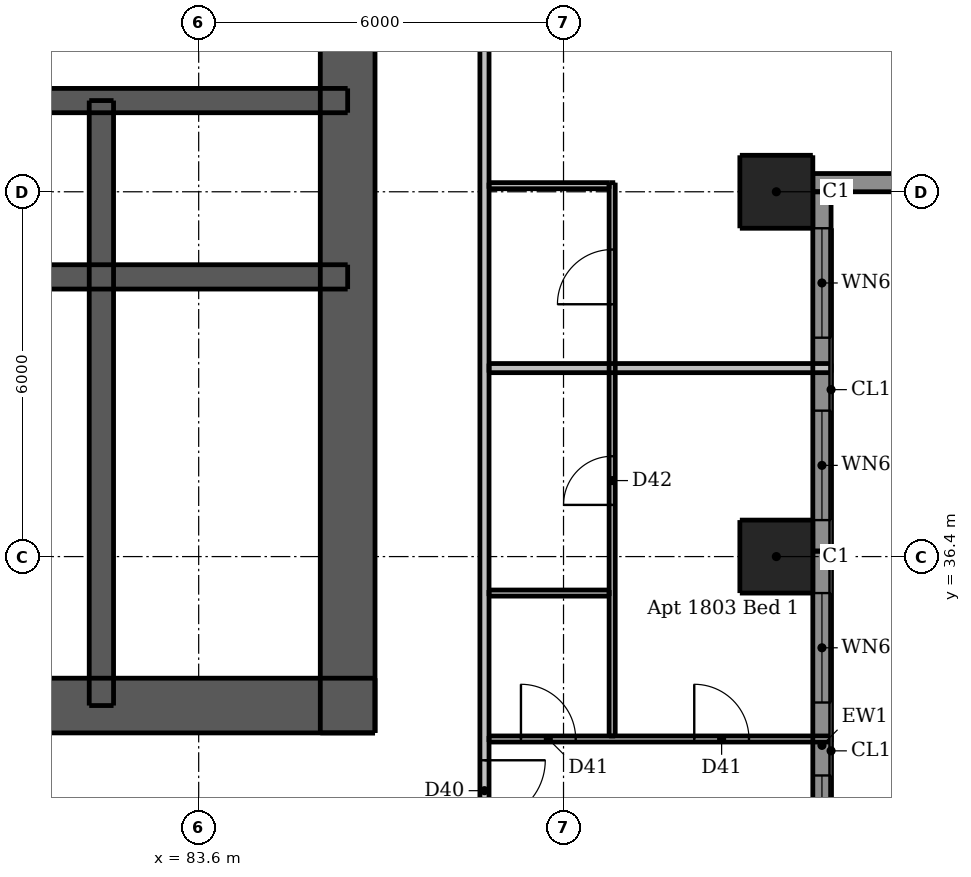
"""IFC4 building model, lengths in metres.
Left out: names, types, materials, properties, quantities, classifications, styles, units other than length and angle.
Written with IfcOpenShell. Run it as: python <this file> out.ifc"""

import sys

from ifc_helpers import new_model, si_unit, direction, frame, frame_2d, origin, origin_2d, place, context, subcontext, project, spatial, rectangle, extrude, element, fill, save


model = new_model("IFC4")
c1 = context("Model", 3, precision=1e-05, world=origin(), true_north=direction((0.0, 1.0)))
c2 = subcontext(c1, "Body", "Model", "MODEL_VIEW")
j1 = project(units=[si_unit("LENGTHUNIT", "METRE"), si_unit("PLANEANGLEUNIT", "RADIAN")], contexts=[c1])
p1 = place(None, origin())
s1 = spatial("IfcSite", under=j1, at=p1, CompositionType="ELEMENT")
p2 = place(p1, origin())
s2 = spatial("IfcBuilding", under=s1, at=p2, CompositionType="ELEMENT")
p3 = place(p2, frame((0.0, 0.0, 66.4)))
s3 = spatial("IfcBuildingStorey", under=s2, at=p3, CompositionType="ELEMENT", Elevation=66.4)
p4 = place(p3, frame((62.5, 33.95, 0.0), z_axis=(0.0, 0.0, 1.0), x_axis=(1.0, 0.0, 0.0)))
e1 = element("IfcWall", 1, at=p4, inside=s3, PredefinedType="SHEAR", context=c2, shape_type="SweptSolid", body=[
    extrude(rectangle(XDim=24.0, YDim=0.9, at=frame_2d((12.0, 0.0))), origin(), (0.0, 0.0, 1.0), 2.95),
])
p5 = place(p4, frame((2.05, 0.0, 0.0)))
e2 = element("IfcOpeningElement", 2, at=p5, cuts=e1, PredefinedType="OPENING", context=c2, shape_type="SweptSolid", body=[
    extrude(rectangle(XDim=1.1, YDim=2.1, at=frame_2d((0.55, 1.05))), frame((0.0, 0.46, 0.0), z_axis=(0.0, -1.0, 0.0), x_axis=(1.0, 0.0, 0.0)), (0.0, 0.0, 1.0), 0.92),
])
p6 = place(p4, frame((20.85, 0.0, 0.0)))
e3 = element("IfcOpeningElement", 3, at=p6, cuts=e1, PredefinedType="OPENING", context=c2, shape_type="SweptSolid", body=[
    extrude(rectangle(XDim=1.1, YDim=2.1, at=frame_2d((0.55, 1.05))), frame((0.0, 0.46, 0.0), z_axis=(0.0, -1.0, 0.0), x_axis=(1.0, 0.0, 0.0)), (0.0, 0.0, 1.0), 0.92),
])
p7 = place(p4, frame((8.0, 0.0, 0.0)))
e4 = element("IfcOpeningElement", 4, at=p7, cuts=e1, PredefinedType="OPENING", context=c2, shape_type="SweptSolid", body=[
    extrude(rectangle(XDim=1.1, YDim=2.1, at=frame_2d((0.55, 1.05))), frame((0.0, 0.46, 0.0), z_axis=(0.0, -1.0, 0.0), x_axis=(1.0, 0.0, 0.0)), (0.0, 0.0, 1.0), 0.92),
])
p8 = place(p4, frame((15.3, 0.0, 0.0)))
e5 = element("IfcOpeningElement", 5, at=p8, cuts=e1, PredefinedType="OPENING", context=c2, shape_type="SweptSolid", body=[
    extrude(rectangle(XDim=0.9, YDim=2.1, at=frame_2d((0.45, 1.05))), frame((0.0, 0.46, 0.0), z_axis=(0.0, -1.0, 0.0), x_axis=(1.0, 0.0, 0.0)), (0.0, 0.0, 1.0), 0.92),
])
p9 = place(p3, frame((86.05, 33.5, 0.0), z_axis=(0.0, 0.0, 1.0), x_axis=(0.0, 1.0, 0.0)))
e6 = element("IfcWall", 6, at=p9, inside=s3, PredefinedType="SHEAR", context=c2, shape_type="SweptSolid", body=[
    extrude(rectangle(XDim=24.0, YDim=0.9, at=frame_2d((12.0, 0.0))), origin(), (0.0, 0.0, 1.0), 2.95),
])
p10 = place(p9, frame((11.2, 0.0, 0.0)))
e7 = element("IfcOpeningElement", 7, at=p10, cuts=e6, PredefinedType="OPENING", context=c2, shape_type="SweptSolid", body=[
    extrude(rectangle(XDim=1.6, YDim=2.1, at=frame_2d((0.8, 1.05))), frame((0.0, 0.46, 0.0), z_axis=(0.0, -1.0, 0.0), x_axis=(1.0, 0.0, 0.0)), (0.0, 0.0, 1.0), 0.92),
])
p11 = place(p3, frame((62.95, 41.0, 0.0), z_axis=(0.0, 0.0, 1.0), x_axis=(1.0, 0.0, 0.0)))
e8 = element("IfcWall", 8, at=p11, inside=s3, PredefinedType="SHEAR", context=c2, shape_type="SweptSolid", body=[
    extrude(rectangle(XDim=23.1, YDim=0.4, at=frame_2d((11.55, 0.0))), origin(), (0.0, 0.0, 1.0), 2.95),
])
p12 = place(p3, frame((62.95, 43.9, 0.0), z_axis=(0.0, 0.0, 1.0), x_axis=(1.0, 0.0, 0.0)))
e9 = element("IfcWall", 9, at=p12, inside=s3, PredefinedType="SHEAR", context=c2, shape_type="SweptSolid", body=[
    extrude(rectangle(XDim=23.1, YDim=0.4, at=frame_2d((11.55, 0.0))), origin(), (0.0, 0.0, 1.0), 2.95),
])
p13 = place(p12, frame((0.662, 0.0, 0.0)))
e10 = element("IfcOpeningElement", 10, at=p13, cuts=e9, PredefinedType="OPENING", context=c2, shape_type="SweptSolid", body=[
    extrude(rectangle(XDim=0.8, YDim=2.1, at=frame_2d((0.4, 1.05))), frame((0.0, 0.21, 0.0), z_axis=(0.0, -1.0, 0.0), x_axis=(1.0, 0.0, 0.0)), (0.0, 0.0, 1.0), 0.42),
])
p14 = place(p12, frame((2.312, 0.0, 0.0)))
e11 = element("IfcOpeningElement", 11, at=p14, cuts=e9, PredefinedType="OPENING", context=c2, shape_type="SweptSolid", body=[
    extrude(rectangle(XDim=0.9, YDim=2.1, at=frame_2d((0.45, 1.05))), frame((0.0, 0.21, 0.0), z_axis=(0.0, -1.0, 0.0), x_axis=(1.0, 0.0, 0.0)), (0.0, 0.0, 1.0), 0.42),
])
p15 = place(p12, frame((20.5, 0.0, 0.0)))
e12 = element("IfcOpeningElement", 12, at=p15, cuts=e9, PredefinedType="OPENING", context=c2, shape_type="SweptSolid", body=[
    extrude(rectangle(XDim=0.9, YDim=2.1, at=frame_2d((0.45, 1.05))), frame((0.0, 0.21, 0.0), z_axis=(0.0, -1.0, 0.0), x_axis=(1.0, 0.0, 0.0)), (0.0, 0.0, 1.0), 0.42),
])
p16 = place(p12, frame((4.75, 0.0, 0.0)))
e13 = element("IfcOpeningElement", 13, at=p16, cuts=e9, PredefinedType="OPENING", context=c2, shape_type="SweptSolid", body=[
    extrude(rectangle(XDim=1.1, YDim=2.1, at=frame_2d((0.55, 1.05))), frame((0.0, 0.21, 0.0), z_axis=(0.0, -1.0, 0.0), x_axis=(1.0, 0.0, 0.0)), (0.0, 0.0, 1.0), 0.42),
])
p17 = place(p12, frame((7.25, 0.0, 0.0)))
e14 = element("IfcOpeningElement", 14, at=p17, cuts=e9, PredefinedType="OPENING", context=c2, shape_type="SweptSolid", body=[
    extrude(rectangle(XDim=1.1, YDim=2.1, at=frame_2d((0.55, 1.05))), frame((0.0, 0.21, 0.0), z_axis=(0.0, -1.0, 0.0), x_axis=(1.0, 0.0, 0.0)), (0.0, 0.0, 1.0), 0.42),
])
p18 = place(p12, frame((9.75, 0.0, 0.0)))
e15 = element("IfcOpeningElement", 15, at=p18, cuts=e9, PredefinedType="OPENING", context=c2, shape_type="SweptSolid", body=[
    extrude(rectangle(XDim=1.1, YDim=2.1, at=frame_2d((0.55, 1.05))), frame((0.0, 0.21, 0.0), z_axis=(0.0, -1.0, 0.0), x_axis=(1.0, 0.0, 0.0)), (0.0, 0.0, 1.0), 0.42),
])
p19 = place(p12, frame((12.25, 0.0, 0.0)))
e16 = element("IfcOpeningElement", 16, at=p19, cuts=e9, PredefinedType="OPENING", context=c2, shape_type="SweptSolid", body=[
    extrude(rectangle(XDim=1.1, YDim=2.1, at=frame_2d((0.55, 1.05))), frame((0.0, 0.21, 0.0), z_axis=(0.0, -1.0, 0.0), x_axis=(1.0, 0.0, 0.0)), (0.0, 0.0, 1.0), 0.42),
])
p20 = place(p12, frame((14.75, 0.0, 0.0)))
e17 = element("IfcOpeningElement", 17, at=p20, cuts=e9, PredefinedType="OPENING", context=c2, shape_type="SweptSolid", body=[
    extrude(rectangle(XDim=1.1, YDim=2.1, at=frame_2d((0.55, 1.05))), frame((0.0, 0.21, 0.0), z_axis=(0.0, -1.0, 0.0), x_axis=(1.0, 0.0, 0.0)), (0.0, 0.0, 1.0), 0.42),
])
p21 = place(p12, frame((17.25, 0.0, 0.0)))
e18 = element("IfcOpeningElement", 18, at=p21, cuts=e9, PredefinedType="OPENING", context=c2, shape_type="SweptSolid", body=[
    extrude(rectangle(XDim=1.1, YDim=2.1, at=frame_2d((0.55, 1.05))), frame((0.0, 0.21, 0.0), z_axis=(0.0, -1.0, 0.0), x_axis=(1.0, 0.0, 0.0)), (0.0, 0.0, 1.0), 0.42),
])
p22 = place(p3, frame((82.0, 33.95, 0.0), z_axis=(0.0, 0.0, 1.0), x_axis=(0.0, 1.0, 0.0)))
e19 = element("IfcWall", 19, at=p22, inside=s3, PredefinedType="SHEAR", context=c2, shape_type="SweptSolid", body=[
    extrude(rectangle(XDim=9.95, YDim=0.4, at=frame_2d((4.975, 0.0))), origin(), (0.0, 0.0, 1.0), 2.95),
])
for number, where, z_axis, x_axis in (
    (20, (93.1, 36.4, 0.0), (0.0, 0.0, 1.0), (1.0, 0.0, 0.0)),
    (21, (93.1, 42.4, 0.0), (0.0, 0.0, 1.0), (1.0, 0.0, 0.0)),
):
    element("IfcColumn", number, at=place(p3, frame(where, z_axis=z_axis, x_axis=x_axis)), inside=s3, PredefinedType="COLUMN", context=c2, shape_type="SweptSolid", body=[
        extrude(rectangle(XDim=1.2, YDim=1.2, at=origin_2d()), origin(), (0.0, 0.0, 1.0), 2.95),
    ])
p23 = place(p3, frame((93.7, 42.55, 0.0), z_axis=(0.0, 0.0, 1.0), x_axis=(1.0, 0.0, 0.0)))
e22 = element("IfcWall", 22, at=p23, inside=s3, PredefinedType="SOLIDWALL", context=c2, shape_type="SweptSolid", body=[
    extrude(rectangle(XDim=4.8, YDim=0.3, at=frame_2d((2.4, 0.0))), origin(), (0.0, 0.0, 1.0), 2.95),
])
p24 = place(p23, frame((1.35, 0.0, 0.15)))
e23 = element("IfcOpeningElement", 23, at=p24, cuts=e22, PredefinedType="OPENING", context=c2, shape_type="SweptSolid", body=[
    extrude(rectangle(XDim=2.4, YDim=2.1, at=frame_2d((1.2, 1.05))), frame((0.0, 0.16, 0.0), z_axis=(0.0, -1.0, 0.0), x_axis=(1.0, 0.0, 0.0)), (0.0, 0.0, 1.0), 0.32),
])
p25 = place(p3, frame((93.85, 30.1, 0.0), z_axis=(0.0, 0.0, 1.0), x_axis=(0.0, 1.0, 0.0)))
e24 = element("IfcWall", 24, at=p25, inside=s3, PredefinedType="SOLIDWALL", context=c2, shape_type="SweptSolid", body=[
    extrude(rectangle(XDim=6.39, YDim=0.3, at=frame_2d((3.195, 0.0))), origin(), (0.0, 0.0, 1.0), 2.341),
])
p26 = place(p25, frame((0.9, 0.0, 0.15)))
e25 = element("IfcOpeningElement", 25, at=p26, cuts=e24, PredefinedType="OPENING", context=c2, shape_type="SweptSolid", body=[
    extrude(rectangle(XDim=1.8, YDim=2.1, at=frame_2d((0.9, 1.05))), frame((0.0, 0.16, 0.0), z_axis=(0.0, -1.0, 0.0), x_axis=(1.0, 0.0, 0.0)), (0.0, 0.0, 1.0), 0.32),
])
p27 = place(p25, frame((3.9, 0.0, 0.15)))
e26 = element("IfcOpeningElement", 26, at=p27, cuts=e24, PredefinedType="OPENING", context=c2, shape_type="SweptSolid", body=[
    extrude(rectangle(XDim=1.8, YDim=2.1, at=frame_2d((0.9, 1.05))), frame((0.0, 0.16, 0.0), z_axis=(0.0, -1.0, 0.0), x_axis=(1.0, 0.0, 0.0)), (0.0, 0.0, 1.0), 0.32),
])
p28 = place(p3, frame((93.85, 36.49, 0.0), z_axis=(0.0, 0.0, 1.0), x_axis=(0.0, 1.0, 0.0)))
e27 = element("IfcWall", 27, at=p28, inside=s3, PredefinedType="SOLIDWALL", context=c2, shape_type="SweptSolid", body=[
    extrude(rectangle(XDim=5.91, YDim=0.3, at=frame_2d((2.955, 0.0))), origin(), (0.0, 0.0, 1.0), 2.95),
])
p29 = place(p28, frame((0.51, 0.0, 0.15)))
e28 = element("IfcOpeningElement", 28, at=p29, cuts=e27, PredefinedType="OPENING", context=c2, shape_type="SweptSolid", body=[
    extrude(rectangle(XDim=1.8, YDim=2.1, at=frame_2d((0.9, 1.05))), frame((0.0, 0.16, 0.0), z_axis=(0.0, -1.0, 0.0), x_axis=(1.0, 0.0, 0.0)), (0.0, 0.0, 1.0), 0.32),
])
p30 = place(p28, frame((3.51, 0.0, 0.15)))
e29 = element("IfcOpeningElement", 29, at=p30, cuts=e27, PredefinedType="OPENING", context=c2, shape_type="SweptSolid", body=[
    extrude(rectangle(XDim=1.8, YDim=2.1, at=frame_2d((0.9, 1.05))), frame((0.0, 0.16, 0.0), z_axis=(0.0, -1.0, 0.0), x_axis=(1.0, 0.0, 0.0)), (0.0, 0.0, 1.0), 0.32),
])
p31 = place(p3, frame((90.4, 33.45, 0.0), z_axis=(0.0, 0.0, 1.0), x_axis=(0.0, 1.0, 0.0)))
e30 = element("IfcWall", 30, at=p31, inside=s3, PredefinedType="PARTITIONING", context=c2, shape_type="SweptSolid", body=[
    extrude(rectangle(XDim=9.1, YDim=0.1, at=frame_2d((4.55, 0.0))), origin(), (0.0, 0.0, 1.0), 2.95),
])
p32 = place(p31, frame((3.8, 0.0, 0.0)))
e31 = element("IfcOpeningElement", 31, at=p32, cuts=e30, PredefinedType="OPENING", context=c2, shape_type="SweptSolid", body=[
    extrude(rectangle(XDim=0.8, YDim=2.1, at=frame_2d((0.4, 1.05))), frame((0.0, 0.06, 0.0), z_axis=(0.0, -1.0, 0.0), x_axis=(1.0, 0.0, 0.0)), (0.0, 0.0, 1.0), 0.12),
])
p33 = place(p31, frame((7.1, 0.0, 0.0)))
e32 = element("IfcOpeningElement", 32, at=p33, cuts=e30, PredefinedType="OPENING", context=c2, shape_type="SweptSolid", body=[
    extrude(rectangle(XDim=0.9, YDim=2.1, at=frame_2d((0.45, 1.05))), frame((0.0, 0.06, 0.0), z_axis=(0.0, -1.0, 0.0), x_axis=(1.0, 0.0, 0.0)), (0.0, 0.0, 1.0), 0.12),
])
p34 = place(p3, frame((88.375, 42.5, 0.0), z_axis=(0.0, 0.0, 1.0), x_axis=(1.0, 0.0, 0.0)))
e33 = element("IfcWall", 33, at=p34, inside=s3, PredefinedType="PARTITIONING", context=c2, shape_type="SweptSolid", body=[
    extrude(rectangle(XDim=1.975, YDim=0.1, at=frame_2d((0.988, 0.0))), origin(), (0.0, 0.0, 1.0), 2.332),
])
p35 = place(p3, frame((88.375, 35.8, 0.0), z_axis=(0.0, 0.0, 1.0), x_axis=(1.0, 0.0, 0.0)))
e34 = element("IfcWall", 34, at=p35, inside=s3, PredefinedType="PARTITIONING", context=c2, shape_type="SweptSolid", body=[
    extrude(rectangle(XDim=1.975, YDim=0.1, at=frame_2d((0.988, 0.0))), origin(), (0.0, 0.0, 1.0), 2.95),
])
p36 = place(p3, frame((88.375, 33.4, 0.0), z_axis=(0.0, 0.0, 1.0), x_axis=(1.0, 0.0, 0.0)))
e35 = element("IfcWall", 35, at=p36, inside=s3, PredefinedType="PARTITIONING", context=c2, shape_type="SweptSolid", body=[
    extrude(rectangle(XDim=5.625, YDim=0.1, at=frame_2d((2.812, 0.0))), origin(), (0.0, 0.0, 1.0), 2.95),
])
p37 = place(p36, frame((0.525, 0.0, 0.0)))
e36 = element("IfcOpeningElement", 36, at=p37, cuts=e35, PredefinedType="OPENING", context=c2, shape_type="SweptSolid", body=[
    extrude(rectangle(XDim=0.9, YDim=2.1, at=frame_2d((0.45, 1.05))), frame((0.0, 0.06, 0.0), z_axis=(0.0, -1.0, 0.0), x_axis=(1.0, 0.0, 0.0)), (0.0, 0.0, 1.0), 0.12),
])
p38 = place(p36, frame((3.375, 0.0, 0.0)))
e37 = element("IfcOpeningElement", 37, at=p38, cuts=e35, PredefinedType="OPENING", context=c2, shape_type="SweptSolid", body=[
    extrude(rectangle(XDim=0.9, YDim=2.1, at=frame_2d((0.45, 1.05))), frame((0.0, 0.06, 0.0), z_axis=(0.0, -1.0, 0.0), x_axis=(1.0, 0.0, 0.0)), (0.0, 0.0, 1.0), 0.12),
])
p39 = place(p3, frame((88.3, 60.475, 0.0), z_axis=(0.0, 0.0, 1.0), x_axis=(0.0, -1.0, 0.0)))
e38 = element("IfcWall", 38, at=p39, inside=s3, PredefinedType="PARTITIONING", context=c2, shape_type="SweptSolid", body=[
    extrude(rectangle(XDim=28.7, YDim=0.15, at=frame_2d((14.35, 0.0))), origin(), (0.0, 0.0, 1.0), 2.95),
])
p40 = place(p39, frame((27.425, 0.0, 0.0)))
e39 = element("IfcOpeningElement", 39, at=p40, cuts=e38, PredefinedType="OPENING", context=c2, shape_type="SweptSolid", body=[
    extrude(rectangle(XDim=1.0, YDim=2.1, at=frame_2d((0.5, 1.05))), frame((0.0, 0.085, 0.0), z_axis=(0.0, -1.0, 0.0), x_axis=(1.0, 0.0, 0.0)), (0.0, 0.0, 1.0), 0.17),
])
p41 = place(p39, frame((14.525, 0.0, 0.0)))
e40 = element("IfcOpeningElement", 40, at=p41, cuts=e38, PredefinedType="OPENING", context=c2, shape_type="SweptSolid", body=[
    extrude(rectangle(XDim=1.0, YDim=2.1, at=frame_2d((0.5, 1.05))), frame((0.0, 0.085, 0.0), z_axis=(0.0, -1.0, 0.0), x_axis=(1.0, 0.0, 0.0)), (0.0, 0.0, 1.0), 0.17),
])
p42 = place(p39, frame((3.775, 0.0, 0.0)))
e41 = element("IfcOpeningElement", 41, at=p42, cuts=e38, PredefinedType="OPENING", context=c2, shape_type="SweptSolid", body=[
    extrude(rectangle(XDim=1.0, YDim=2.1, at=frame_2d((0.5, 1.05))), frame((0.0, 0.085, 0.0), z_axis=(0.0, -1.0, 0.0), x_axis=(1.0, 0.0, 0.0)), (0.0, 0.0, 1.0), 0.17),
])
p43 = place(p3, frame((88.375, 39.5, 0.0), z_axis=(0.0, 0.0, 1.0), x_axis=(1.0, 0.0, 0.0)))
e42 = element("IfcWall", 42, at=p43, inside=s3, PredefinedType="PARTITIONING", context=c2, shape_type="SweptSolid", body=[
    extrude(rectangle(XDim=5.625, YDim=0.15, at=frame_2d((2.812, 0.0))), origin(), (0.0, 0.0, 1.0), 2.95),
])
p44 = place(p26, origin())
e43 = element("IfcWindow", 43, at=p44, inside=s3, PartitioningType="DOUBLE_PANEL_VERTICAL", PredefinedType="WINDOW", context=c2, shape_type="SweptSolid", body=[
    extrude(rectangle(XDim=1.8, YDim=2.1, at=frame_2d((0.9, 1.05))), frame((0.0, 0.03, 0.0), z_axis=(0.0, -1.0, 0.0), x_axis=(1.0, 0.0, 0.0)), (0.0, 0.0, 1.0), 0.06),
])
fill(e25, e43)
p45 = place(p27, origin())
e44 = element("IfcWindow", 44, at=p45, inside=s3, PartitioningType="DOUBLE_PANEL_VERTICAL", PredefinedType="WINDOW", context=c2, shape_type="SweptSolid", body=[
    extrude(rectangle(XDim=1.8, YDim=2.1, at=frame_2d((0.9, 1.05))), frame((0.0, 0.03, 0.0), z_axis=(0.0, -1.0, 0.0), x_axis=(1.0, 0.0, 0.0)), (0.0, 0.0, 1.0), 0.06),
])
fill(e26, e44)
p46 = place(p29, origin())
e45 = element("IfcWindow", 45, at=p46, inside=s3, PartitioningType="DOUBLE_PANEL_VERTICAL", PredefinedType="WINDOW", context=c2, shape_type="SweptSolid", body=[
    extrude(rectangle(XDim=1.8, YDim=2.1, at=frame_2d((0.9, 1.05))), frame((0.0, 0.03, 0.0), z_axis=(0.0, -1.0, 0.0), x_axis=(1.0, 0.0, 0.0)), (0.0, 0.0, 1.0), 0.06),
])
fill(e28, e45)
p47 = place(p30, origin())
e46 = element("IfcWindow", 46, at=p47, inside=s3, PartitioningType="DOUBLE_PANEL_VERTICAL", PredefinedType="WINDOW", context=c2, shape_type="SweptSolid", body=[
    extrude(rectangle(XDim=1.8, YDim=2.1, at=frame_2d((0.9, 1.05))), frame((0.0, 0.03, 0.0), z_axis=(0.0, -1.0, 0.0), x_axis=(1.0, 0.0, 0.0)), (0.0, 0.0, 1.0), 0.06),
])
fill(e29, e46)
p48 = place(p6, origin())
e47 = element("IfcDoor", 47, at=p48, inside=s3, OperationType="SINGLE_SWING_RIGHT", PredefinedType="DOOR", context=c2, shape_type="SweptSolid", body=[
    extrude(rectangle(XDim=1.1, YDim=2.1, at=frame_2d((0.55, 1.05))), frame((0.0, 0.438, 0.0), z_axis=(0.0, -1.0, 0.0), x_axis=(1.0, 0.0, 0.0)), (0.0, 0.0, 1.0), 0.05),
])
fill(e3, e47)
p49 = place(p15, origin())
e48 = element("IfcDoor", 48, at=p49, inside=s3, OperationType="SINGLE_SWING_LEFT", PredefinedType="DOOR", context=c2, shape_type="SweptSolid", body=[
    extrude(rectangle(XDim=0.9, YDim=2.1, at=frame_2d((0.45, 1.05))), frame((0.0, -0.138, 0.0), z_axis=(0.0, -1.0, 0.0), x_axis=(1.0, 0.0, 0.0)), (0.0, 0.0, 1.0), 0.05),
])
fill(e12, e48)
p50 = place(p21, origin())
e49 = element("IfcDoor", 49, at=p50, inside=s3, OperationType="DOUBLE_DOOR_SLIDING", PredefinedType="DOOR", context=c2, shape_type="SweptSolid", body=[
    extrude(rectangle(XDim=1.1, YDim=2.1, at=frame_2d((0.55, 1.05))), frame((0.0, 0.025, 0.0), z_axis=(0.0, -1.0, 0.0), x_axis=(1.0, 0.0, 0.0)), (0.0, 0.0, 1.0), 0.05),
])
fill(e18, e49)
p51 = place(p40, origin())
e50 = element("IfcDoor", 50, at=p51, inside=s3, OperationType="SINGLE_SWING_LEFT", PredefinedType="DOOR", context=c2, shape_type="SweptSolid", body=[
    extrude(rectangle(XDim=1.0, YDim=2.1, at=frame_2d((0.5, 1.05))), frame((0.0, 0.025, 0.0), z_axis=(0.0, -1.0, 0.0), x_axis=(1.0, 0.0, 0.0)), (0.0, 0.0, 1.0), 0.05),
])
fill(e39, e50)
p52 = place(p37, origin())
e51 = element("IfcDoor", 51, at=p52, inside=s3, OperationType="SINGLE_SWING_LEFT", PredefinedType="DOOR", context=c2, shape_type="SweptSolid", body=[
    extrude(rectangle(XDim=0.9, YDim=2.1, at=frame_2d((0.45, 1.05))), frame((0.0, 0.025, 0.0), z_axis=(0.0, -1.0, 0.0), x_axis=(1.0, 0.0, 0.0)), (0.0, 0.0, 1.0), 0.05),
])
fill(e36, e51)
p53 = place(p38, origin())
e52 = element("IfcDoor", 52, at=p53, inside=s3, OperationType="SINGLE_SWING_LEFT", PredefinedType="DOOR", context=c2, shape_type="SweptSolid", body=[
    extrude(rectangle(XDim=0.9, YDim=2.1, at=frame_2d((0.45, 1.05))), frame((0.0, 0.025, 0.0), z_axis=(0.0, -1.0, 0.0), x_axis=(1.0, 0.0, 0.0)), (0.0, 0.0, 1.0), 0.05),
])
fill(e37, e52)
p54 = place(p32, origin())
e53 = element("IfcDoor", 53, at=p54, inside=s3, OperationType="SINGLE_SWING_LEFT", PredefinedType="DOOR", context=c2, shape_type="SweptSolid", body=[
    extrude(rectangle(XDim=0.8, YDim=2.1, at=frame_2d((0.4, 1.05))), frame((0.0, 0.025, 0.0), z_axis=(0.0, -1.0, 0.0), x_axis=(1.0, 0.0, 0.0)), (0.0, 0.0, 1.0), 0.05),
])
fill(e31, e53)
p55 = place(p33, origin())
e54 = element("IfcDoor", 54, at=p55, inside=s3, OperationType="SINGLE_SWING_LEFT", PredefinedType="DOOR", context=c2, shape_type="SweptSolid", body=[
    extrude(rectangle(XDim=0.9, YDim=2.1, at=frame_2d((0.45, 1.05))), frame((0.0, 0.025, 0.0), z_axis=(0.0, -1.0, 0.0), x_axis=(1.0, 0.0, 0.0)), (0.0, 0.0, 1.0), 0.05),
])
fill(e32, e54)
save(model, sys.argv[1])
